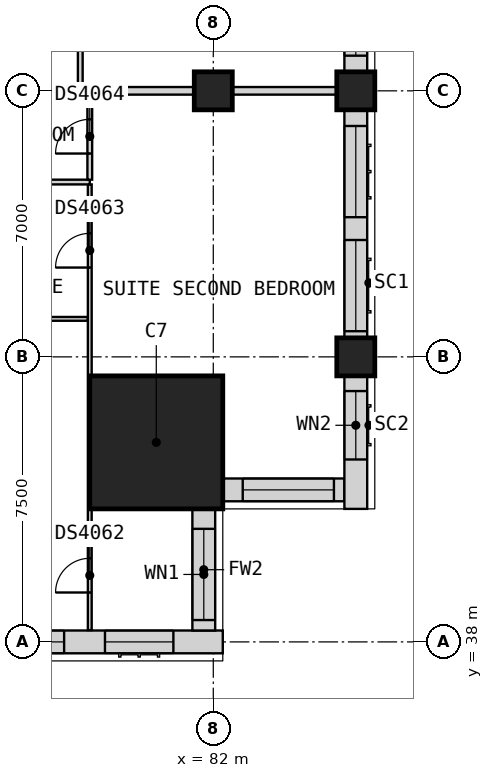
"""IFC4 building model, lengths in metres.
Left out: names, types, materials, properties, quantities, classifications, styles, units other than length and angle.
Written with IfcOpenShell. Run it as: python <this file> out.ifc"""

import sys

from ifc_helpers import new_model, si_unit, direction, frame, frame_2d, origin, origin_2d, place, context, subcontext, project, spatial, rectangle, extrude, element, fill, save


model = new_model("IFC4")
c1 = context("Model", 3, precision=1e-05, world=origin(), true_north=direction((0.0, 1.0)))
c2 = subcontext(c1, "Body", "Model", "MODEL_VIEW")
j1 = project(units=[si_unit("LENGTHUNIT", "METRE"), si_unit("PLANEANGLEUNIT", "RADIAN")], contexts=[c1])
p1 = place(None, origin())
s1 = spatial("IfcSite", under=j1, at=p1, CompositionType="ELEMENT")
p2 = place(p1, origin())
s2 = spatial("IfcBuilding", under=s1, at=p2, CompositionType="ELEMENT")
p3 = place(p2, frame((0.0, 0.0, 141.0)))
s3 = spatial("IfcBuildingStorey", under=s2, at=p3, CompositionType="ELEMENT", Elevation=141.0)
for number, where, z_axis, x_axis in (
    (1, (85.75, 45.5, 0.0), (0.0, 0.0, 1.0), (1.0, 0.0, 0.0)),
    (2, (85.75, 52.5, 0.0), (0.0, 0.0, 1.0), (1.0, 0.0, 0.0)),
    (3, (82.0, 52.5, 0.0), (0.0, 0.0, 1.0), (1.0, 0.0, 0.0)),
):
    element("IfcColumn", number, at=place(p3, frame(where, z_axis=z_axis, x_axis=x_axis)), inside=s3, PredefinedType="COLUMN", context=c2, shape_type="SweptSolid", body=[
        extrude(rectangle(XDim=1.0, YDim=1.0, at=origin_2d()), origin(), (0.0, 0.0, 1.0), 3.6),
    ])
p4 = place(p3, frame((80.5, 43.25, 0.0), z_axis=(0.0, 0.0, 1.0), x_axis=(1.0, 0.0, 0.0)))
e4 = element("IfcColumn", 4, at=p4, inside=s3, PredefinedType="COLUMN", context=c2, shape_type="SweptSolid", body=[
    extrude(rectangle(XDim=3.5, YDim=3.5, at=origin_2d()), origin(), (0.0, 0.0, 1.0), 3.6),
])
p5 = place(p3, frame((75.0, 38.0, 0.0), z_axis=(0.0, 0.0, 1.0), x_axis=(1.0, 0.0, 0.0)))
e5 = element("IfcWall", 5, at=p5, inside=s3, PredefinedType="SOLIDWALL", context=c2, shape_type="SweptSolid", body=[
    extrude(rectangle(XDim=7.25, YDim=0.6, at=frame_2d((3.625, 0.0))), origin(), (0.0, 0.0, 1.0), 2.85),
])
p6 = place(p5, frame((0.675, 0.0, 0.8)))
e6 = element("IfcOpeningElement", 6, at=p6, cuts=e5, PredefinedType="OPENING", context=c2, shape_type="SweptSolid", body=[
    extrude(rectangle(XDim=2.4, YDim=1.8, at=frame_2d((1.2, 0.9))), frame((0.0, 0.31, 0.0), z_axis=(0.0, -1.0, 0.0), x_axis=(1.0, 0.0, 0.0)), (0.0, 0.0, 1.0), 0.62),
])
p7 = place(p5, frame((4.15, 0.0, 0.8)))
e7 = element("IfcOpeningElement", 7, at=p7, cuts=e5, PredefinedType="OPENING", context=c2, shape_type="SweptSolid", body=[
    extrude(rectangle(XDim=1.8, YDim=1.8, at=frame_2d((0.9, 0.9))), frame((0.0, 0.31, 0.0), z_axis=(0.0, -1.0, 0.0), x_axis=(1.0, 0.0, 0.0)), (0.0, 0.0, 1.0), 0.62),
])
p8 = place(p3, frame((81.75, 38.3, 0.0), z_axis=(0.0, 0.0, 1.0), x_axis=(0.0, 1.0, 0.0)))
e8 = element("IfcWall", 8, at=p8, inside=s3, PredefinedType="SOLIDWALL", context=c2, shape_type="SweptSolid", body=[
    extrude(rectangle(XDim=3.2, YDim=0.6, at=frame_2d((1.6, 0.0))), origin(), (0.0, 0.0, 1.0), 3.35),
])
p9 = place(p8, frame((0.275, 0.0, 0.8)))
e9 = element("IfcOpeningElement", 9, at=p9, cuts=e8, PredefinedType="OPENING", context=c2, shape_type="SweptSolid", body=[
    extrude(rectangle(XDim=2.4, YDim=1.8, at=frame_2d((1.2, 0.9))), frame((0.0, 0.31, 0.0), z_axis=(0.0, -1.0, 0.0), x_axis=(1.0, 0.0, 0.0)), (0.0, 0.0, 1.0), 0.62),
])
p10 = place(p3, frame((82.25, 42.0, 0.0), z_axis=(0.0, 0.0, 1.0), x_axis=(1.0, 0.0, 0.0)))
e10 = element("IfcWall", 10, at=p10, inside=s3, PredefinedType="SOLIDWALL", context=c2, shape_type="SweptSolid", body=[
    extrude(rectangle(XDim=3.2, YDim=0.6, at=frame_2d((1.6, 0.0))), origin(), (0.0, 0.0, 1.0), 3.35),
])
p11 = place(p10, frame((0.525, 0.0, 0.8)))
e11 = element("IfcOpeningElement", 11, at=p11, cuts=e10, PredefinedType="OPENING", context=c2, shape_type="SweptSolid", body=[
    extrude(rectangle(XDim=2.4, YDim=1.8, at=frame_2d((1.2, 0.9))), frame((0.0, 0.31, 0.0), z_axis=(0.0, -1.0, 0.0), x_axis=(1.0, 0.0, 0.0)), (0.0, 0.0, 1.0), 0.62),
])
p12 = place(p3, frame((85.75, 41.5, 0.0), z_axis=(0.0, 0.0, 1.0), x_axis=(0.0, 1.0, 0.0)))
e12 = element("IfcWall", 12, at=p12, inside=s3, PredefinedType="SOLIDWALL", context=c2, shape_type="SweptSolid", body=[
    extrude(rectangle(XDim=3.5, YDim=0.6, at=frame_2d((1.75, 0.0))), origin(), (0.0, 0.0, 1.0), 3.35),
])
p13 = place(p12, frame((1.3, 0.0, 0.8)))
e13 = element("IfcOpeningElement", 13, at=p13, cuts=e12, PredefinedType="OPENING", context=c2, shape_type="SweptSolid", body=[
    extrude(rectangle(XDim=1.8, YDim=1.8, at=frame_2d((0.9, 0.9))), frame((0.0, 0.31, 0.0), z_axis=(0.0, -1.0, 0.0), x_axis=(1.0, 0.0, 0.0)), (0.0, 0.0, 1.0), 0.62),
])
p14 = place(p3, frame((85.75, 46.0, 0.0), z_axis=(0.0, 0.0, 1.0), x_axis=(0.0, 1.0, 0.0)))
e14 = element("IfcWall", 14, at=p14, inside=s3, PredefinedType="SOLIDWALL", context=c2, shape_type="SweptSolid", body=[
    extrude(rectangle(XDim=6.0, YDim=0.6, at=frame_2d((3.0, 0.0))), origin(), (0.0, 0.0, 1.0), 2.85),
])
p15 = place(p14, frame((0.175, 0.0, 0.8)))
e15 = element("IfcOpeningElement", 15, at=p15, cuts=e14, PredefinedType="OPENING", context=c2, shape_type="SweptSolid", body=[
    extrude(rectangle(XDim=2.4, YDim=1.8, at=frame_2d((1.2, 0.9))), frame((0.0, 0.31, 0.0), z_axis=(0.0, -1.0, 0.0), x_axis=(1.0, 0.0, 0.0)), (0.0, 0.0, 1.0), 0.62),
])
p16 = place(p14, frame((3.175, 0.0, 0.8)))
e16 = element("IfcOpeningElement", 16, at=p16, cuts=e14, PredefinedType="OPENING", context=c2, shape_type="SweptSolid", body=[
    extrude(rectangle(XDim=2.4, YDim=1.8, at=frame_2d((1.2, 0.9))), frame((0.0, 0.31, 0.0), z_axis=(0.0, -1.0, 0.0), x_axis=(1.0, 0.0, 0.0)), (0.0, 0.0, 1.0), 0.62),
])
p17 = place(p3, frame((85.75, 53.0, 0.0), z_axis=(0.0, 0.0, 1.0), x_axis=(0.0, 1.0, 0.0)))
e17 = element("IfcWall", 17, at=p17, inside=s3, PredefinedType="SOLIDWALL", context=c2, shape_type="SweptSolid", body=[
    extrude(rectangle(XDim=6.5, YDim=0.6, at=frame_2d((3.25, 0.0))), origin(), (0.0, 0.0, 1.0), 2.85),
])
p18 = place(p17, frame((0.425, 0.0, 0.8)))
e18 = element("IfcOpeningElement", 18, at=p18, cuts=e17, PredefinedType="OPENING", context=c2, shape_type="SweptSolid", body=[
    extrude(rectangle(XDim=2.4, YDim=1.8, at=frame_2d((1.2, 0.9))), frame((0.0, 0.31, 0.0), z_axis=(0.0, -1.0, 0.0), x_axis=(1.0, 0.0, 0.0)), (0.0, 0.0, 1.0), 0.62),
])
p19 = place(p17, frame((3.675, 0.0, 0.8)))
e19 = element("IfcOpeningElement", 19, at=p19, cuts=e17, PredefinedType="OPENING", context=c2, shape_type="SweptSolid", body=[
    extrude(rectangle(XDim=2.4, YDim=1.8, at=frame_2d((1.2, 0.9))), frame((0.0, 0.31, 0.0), z_axis=(0.0, -1.0, 0.0), x_axis=(1.0, 0.0, 0.0)), (0.0, 0.0, 1.0), 0.62),
])
p20 = place(p3, frame((73.725, 52.5, 0.0), z_axis=(0.0, 0.0, 1.0), x_axis=(1.0, 0.0, 0.0)))
e20 = element("IfcWall", 20, at=p20, inside=s3, PredefinedType="PARTITIONING", context=c2, shape_type="SweptSolid", body=[
    extrude(rectangle(XDim=12.525, YDim=0.2, at=frame_2d((6.262, 0.0))), origin(), (0.0, 0.0, 1.0), 3.35),
])
p21 = place(p3, frame((78.8, 42.0, 0.0), z_axis=(0.0, 0.0, 1.0), x_axis=(1.0, 0.0, 0.0)))
e21 = element("IfcWall", 21, at=p21, inside=s3, PredefinedType="PARTITIONING", context=c2, shape_type="SweptSolid", body=[
    extrude(rectangle(XDim=3.44, YDim=0.1, at=frame_2d((1.72, 0.0))), origin(), (0.0, 0.0, 1.0), 3.35),
])
p22 = place(p3, frame((71.35, 46.5, 0.0), z_axis=(0.0, 0.0, 1.0), x_axis=(1.0, 0.0, 0.0)))
e22 = element("IfcWall", 22, at=p22, inside=s3, PredefinedType="PARTITIONING", context=c2, shape_type="SweptSolid", body=[
    extrude(rectangle(XDim=7.35, YDim=0.1, at=frame_2d((3.675, 0.0))), origin(), (0.0, 0.0, 1.0), 3.35),
])
p23 = place(p22, frame((0.65, 0.0, 0.0)))
e23 = element("IfcOpeningElement", 23, at=p23, cuts=e22, PredefinedType="OPENING", context=c2, shape_type="SweptSolid", body=[
    extrude(rectangle(XDim=0.9, YDim=2.1, at=frame_2d((0.45, 1.05))), frame((0.0, 0.06, 0.0), z_axis=(0.0, -1.0, 0.0), x_axis=(1.0, 0.0, 0.0)), (0.0, 0.0, 1.0), 0.12),
])
p24 = place(p3, frame((78.75, 38.31, 0.0), z_axis=(0.0, 0.0, 1.0), x_axis=(0.0, 1.0, 0.0)))
e24 = element("IfcWall", 24, at=p24, inside=s3, PredefinedType="PARTITIONING", context=c2, shape_type="SweptSolid", body=[
    extrude(rectangle(XDim=11.728, YDim=0.1, at=frame_2d((5.864, 0.0))), origin(), (0.0, 0.0, 1.0), 3.35),
])
p25 = place(p24, frame((0.99, 0.0, 0.0)))
e25 = element("IfcOpeningElement", 25, at=p25, cuts=e24, PredefinedType="OPENING", context=c2, shape_type="SweptSolid", body=[
    extrude(rectangle(XDim=0.9, YDim=2.1, at=frame_2d((0.45, 1.05))), frame((0.0, 0.06, 0.0), z_axis=(0.0, -1.0, 0.0), x_axis=(1.0, 0.0, 0.0)), (0.0, 0.0, 1.0), 0.12),
])
p26 = place(p24, frame((9.54, 0.0, 0.0)))
e26 = element("IfcOpeningElement", 26, at=p26, cuts=e24, PredefinedType="OPENING", context=c2, shape_type="SweptSolid", body=[
    extrude(rectangle(XDim=0.9, YDim=2.1, at=frame_2d((0.45, 1.05))), frame((0.0, 0.06, 0.0), z_axis=(0.0, -1.0, 0.0), x_axis=(1.0, 0.0, 0.0)), (0.0, 0.0, 1.0), 0.12),
])
p27 = place(p3, frame((73.725, 50.1, 0.0), z_axis=(0.0, 0.0, 1.0), x_axis=(1.0, 0.0, 0.0)))
e27 = element("IfcWall", 27, at=p27, inside=s3, PredefinedType="PARTITIONING", context=c2, shape_type="SweptSolid", body=[
    extrude(rectangle(XDim=5.025, YDim=0.125, at=frame_2d((2.512, 0.0))), origin(), (0.0, 0.0, 1.0), 3.35),
])
p28 = place(p3, frame((78.5, 52.6, 0.0), z_axis=(0.0, 0.0, 1.0), x_axis=(0.0, 1.0, 0.0)))
e28 = element("IfcWall", 28, at=p28, inside=s3, PredefinedType="PARTITIONING", context=c2, shape_type="SweptSolid", body=[
    extrude(rectangle(XDim=3.587, YDim=0.125, at=frame_2d((1.794, 0.0))), origin(), (0.0, 0.0, 1.0), 3.35),
])
p29 = place(p28, frame((1.325, 0.0, 0.0)))
e29 = element("IfcOpeningElement", 29, at=p29, cuts=e28, PredefinedType="OPENING", context=c2, shape_type="SweptSolid", body=[
    extrude(rectangle(XDim=0.9, YDim=2.1, at=frame_2d((0.45, 1.05))), frame((0.0, 0.073, 0.0), z_axis=(0.0, -1.0, 0.0), x_axis=(1.0, 0.0, 0.0)), (0.0, 0.0, 1.0), 0.145),
])
p30 = place(p3, frame((78.75, 50.163, 0.0), z_axis=(0.0, 0.0, 1.0), x_axis=(0.0, 1.0, 0.0)))
e30 = element("IfcWall", 30, at=p30, inside=s3, PredefinedType="PARTITIONING", context=c2, shape_type="SweptSolid", body=[
    extrude(rectangle(XDim=2.237, YDim=0.125, at=frame_2d((1.119, 0.0))), origin(), (0.0, 0.0, 1.0), 3.35),
])
p31 = place(p30, frame((0.688, 0.0, 0.0)))
e31 = element("IfcOpeningElement", 31, at=p31, cuts=e30, PredefinedType="OPENING", context=c2, shape_type="SweptSolid", body=[
    extrude(rectangle(XDim=0.9, YDim=2.1, at=frame_2d((0.45, 1.05))), frame((0.0, 0.073, 0.0), z_axis=(0.0, -1.0, 0.0), x_axis=(1.0, 0.0, 0.0)), (0.0, 0.0, 1.0), 0.145),
])
p32 = place(p6, origin())
e32 = element("IfcWindow", 32, at=p32, inside=s3, PartitioningType="SINGLE_PANEL", PredefinedType="WINDOW", context=c2, shape_type="SweptSolid", body=[
    extrude(rectangle(XDim=2.4, YDim=1.8, at=frame_2d((1.2, 0.9))), frame((0.0, -0.07, 0.0), z_axis=(0.0, -1.0, 0.0), x_axis=(1.0, 0.0, 0.0)), (0.0, 0.0, 1.0), 0.06),
])
fill(e6, e32)
p33 = place(p7, origin())
e33 = element("IfcWindow", 33, at=p33, inside=s3, PartitioningType="SINGLE_PANEL", PredefinedType="WINDOW", context=c2, shape_type="SweptSolid", body=[
    extrude(rectangle(XDim=1.8, YDim=1.8, at=frame_2d((0.9, 0.9))), frame((0.0, -0.07, 0.0), z_axis=(0.0, -1.0, 0.0), x_axis=(1.0, 0.0, 0.0)), (0.0, 0.0, 1.0), 0.06),
])
fill(e7, e33)
p34 = place(p9, origin())
e34 = element("IfcWindow", 34, at=p34, inside=s3, PartitioningType="SINGLE_PANEL", PredefinedType="WINDOW", context=c2, shape_type="SweptSolid", body=[
    extrude(rectangle(XDim=2.4, YDim=1.8, at=frame_2d((1.2, 0.9))), frame((0.0, -0.07, 0.0), z_axis=(0.0, -1.0, 0.0), x_axis=(1.0, 0.0, 0.0)), (0.0, 0.0, 1.0), 0.06),
])
fill(e9, e34)
p35 = place(p11, origin())
e35 = element("IfcWindow", 35, at=p35, inside=s3, PartitioningType="SINGLE_PANEL", PredefinedType="WINDOW", context=c2, shape_type="SweptSolid", body=[
    extrude(rectangle(XDim=2.4, YDim=1.8, at=frame_2d((1.2, 0.9))), frame((0.0, -0.07, 0.0), z_axis=(0.0, -1.0, 0.0), x_axis=(1.0, 0.0, 0.0)), (0.0, 0.0, 1.0), 0.06),
])
fill(e11, e35)
p36 = place(p13, origin())
e36 = element("IfcWindow", 36, at=p36, inside=s3, PartitioningType="SINGLE_PANEL", PredefinedType="WINDOW", context=c2, shape_type="SweptSolid", body=[
    extrude(rectangle(XDim=1.8, YDim=1.8, at=frame_2d((0.9, 0.9))), frame((0.0, -0.07, 0.0), z_axis=(0.0, -1.0, 0.0), x_axis=(1.0, 0.0, 0.0)), (0.0, 0.0, 1.0), 0.06),
])
fill(e13, e36)
p37 = place(p15, origin())
e37 = element("IfcWindow", 37, at=p37, inside=s3, PartitioningType="SINGLE_PANEL", PredefinedType="WINDOW", context=c2, shape_type="SweptSolid", body=[
    extrude(rectangle(XDim=2.4, YDim=1.8, at=frame_2d((1.2, 0.9))), frame((0.0, -0.07, 0.0), z_axis=(0.0, -1.0, 0.0), x_axis=(1.0, 0.0, 0.0)), (0.0, 0.0, 1.0), 0.06),
])
fill(e15, e37)
p38 = place(p16, origin())
e38 = element("IfcWindow", 38, at=p38, inside=s3, PartitioningType="SINGLE_PANEL", PredefinedType="WINDOW", context=c2, shape_type="SweptSolid", body=[
    extrude(rectangle(XDim=2.4, YDim=1.8, at=frame_2d((1.2, 0.9))), frame((0.0, -0.07, 0.0), z_axis=(0.0, -1.0, 0.0), x_axis=(1.0, 0.0, 0.0)), (0.0, 0.0, 1.0), 0.06),
])
fill(e16, e38)
p39 = place(p18, origin())
e39 = element("IfcWindow", 39, at=p39, inside=s3, PartitioningType="SINGLE_PANEL", PredefinedType="WINDOW", context=c2, shape_type="SweptSolid", body=[
    extrude(rectangle(XDim=2.4, YDim=1.8, at=frame_2d((1.2, 0.9))), frame((0.0, -0.07, 0.0), z_axis=(0.0, -1.0, 0.0), x_axis=(1.0, 0.0, 0.0)), (0.0, 0.0, 1.0), 0.06),
])
fill(e18, e39)
p40 = place(p25, origin())
e40 = element("IfcDoor", 40, at=p40, inside=s3, OperationType="SINGLE_SWING_LEFT", PredefinedType="DOOR", context=c2, shape_type="SweptSolid", body=[
    extrude(rectangle(XDim=0.9, YDim=2.1, at=frame_2d((0.45, 1.05))), frame((0.0, 0.025, 0.0), z_axis=(0.0, -1.0, 0.0), x_axis=(1.0, 0.0, 0.0)), (0.0, 0.0, 1.0), 0.05),
])
fill(e25, e40)
p41 = place(p26, origin())
e41 = element("IfcDoor", 41, at=p41, inside=s3, OperationType="SINGLE_SWING_RIGHT", PredefinedType="DOOR", context=c2, shape_type="SweptSolid", body=[
    extrude(rectangle(XDim=0.9, YDim=2.1, at=frame_2d((0.45, 1.05))), frame((0.0, 0.025, 0.0), z_axis=(0.0, -1.0, 0.0), x_axis=(1.0, 0.0, 0.0)), (0.0, 0.0, 1.0), 0.05),
])
fill(e26, e41)
p42 = place(p31, origin())
e42 = element("IfcDoor", 42, at=p42, inside=s3, OperationType="SINGLE_SWING_LEFT", PredefinedType="DOOR", context=c2, shape_type="SweptSolid", body=[
    extrude(rectangle(XDim=0.9, YDim=2.1, at=frame_2d((0.45, 1.05))), frame((0.0, 0.025, 0.0), z_axis=(0.0, -1.0, 0.0), x_axis=(1.0, 0.0, 0.0)), (0.0, 0.0, 1.0), 0.05),
])
fill(e31, e42)
save(model, sys.argv[1])
